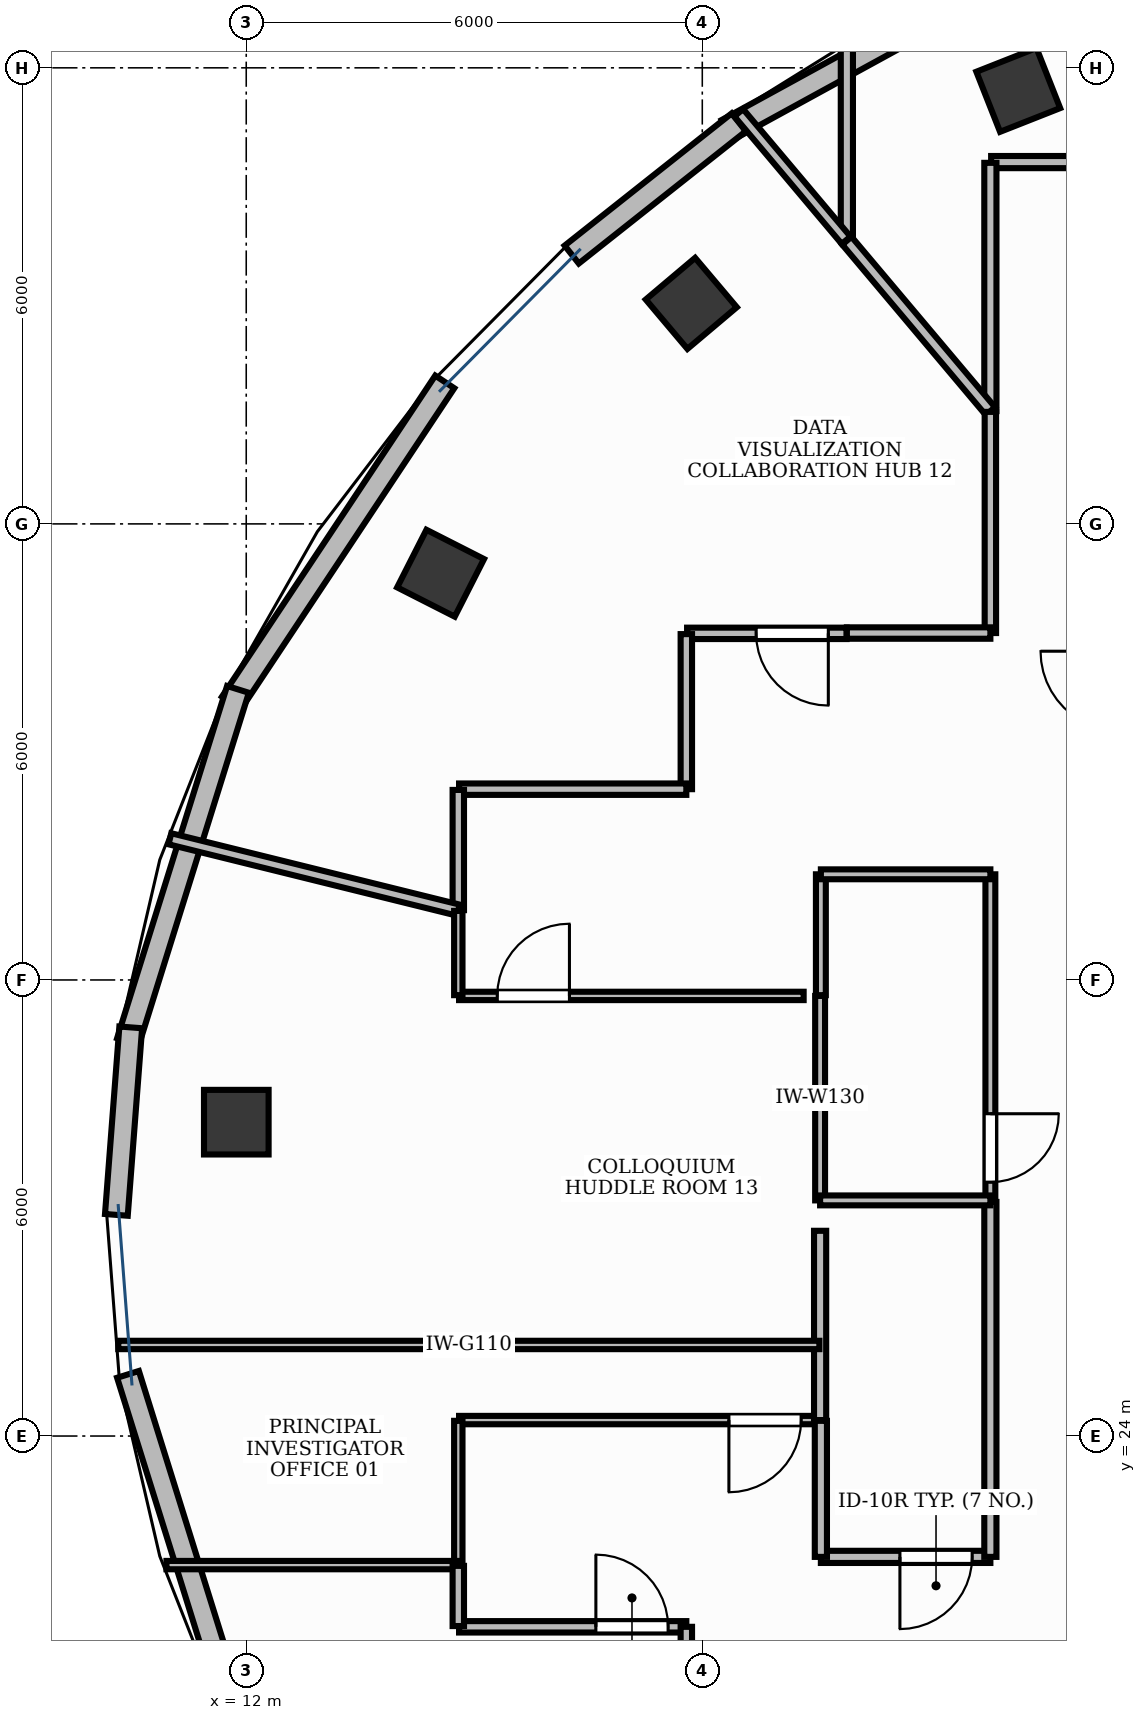
"""IFC4 building model, lengths in metres.
Left out: names, types, materials, properties, quantities, classifications, styles, units other than length and angle.
Written with IfcOpenShell. Run it as: python <this file> out.ifc"""

import sys

from ifc_helpers import new_model, si_unit, direction, frame, frame_2d, origin, origin_2d, place, context, subcontext, project, spatial, rectangle, extrude, element, fill, save


model = new_model("IFC4")
c1 = context("Model", 3, precision=1e-05, world=origin(), true_north=direction((0.0, 1.0)))
c2 = subcontext(c1, "Body", "Model", "MODEL_VIEW")
j1 = project(units=[si_unit("LENGTHUNIT", "METRE"), si_unit("PLANEANGLEUNIT", "RADIAN")], contexts=[c1])
p1 = place(None, origin())
s1 = spatial("IfcSite", under=j1, at=p1, CompositionType="ELEMENT")
p2 = place(p1, origin())
s2 = spatial("IfcBuilding", under=s1, at=p2, CompositionType="ELEMENT")
p3 = place(p2, frame((0.0, 0.0, 282.6)))
s3 = spatial("IfcBuildingStorey", under=s2, at=p3, CompositionType="ELEMENT", Elevation=282.6)
for number, where, z_axis, x_axis in (
    (1, (22.157, 41.709, -0.0), (0.0, 0.0, 1.0), (0.93, 0.367, 0.0)),
    (2, (17.855, 38.901, -0.0), (0.0, 0.0, 1.0), (0.764, 0.645, 0.0)),
    (3, (14.557, 35.351, -0.0), (0.0, 0.0, 1.0), (0.453, 0.891, 0.0)),
    (4, (11.869, 28.129, -0.0), (0.0, 0.0, 1.0), (0.0, 1.0, 0.0)),
):
    element("IfcColumn", number, at=place(p3, frame(where, z_axis=z_axis, x_axis=x_axis)), inside=s3, PredefinedType="COLUMN", context=c2, shape_type="SweptSolid", body=[
        extrude(rectangle(XDim=0.85, YDim=0.85, at=origin_2d()), origin(), (0.0, 0.0, 1.0), 3.791),
    ])
p4 = place(p3, frame((23.286, 43.898, 0.0), z_axis=(0.0, 0.0, 1.0), x_axis=(-0.877062479499, -0.480376318166, 0.0)))
e5 = element("IfcWall", 5, at=p4, inside=s3, PredefinedType="STANDARD", context=c2, shape_type="SweptSolid", body=[
    extrude(rectangle(XDim=5.654, YDim=0.3, at=frame_2d((2.827, 0.0))), origin(), (0.0, 0.0, 1.0), 3.79),
])
p5 = place(p3, frame((18.48, 41.283, 0.0), z_axis=(0.0, 0.0, 1.0), x_axis=(-0.784028163495, -0.620725252303, 0.0)))
e6 = element("IfcWall", 6, at=p5, inside=s3, PredefinedType="STANDARD", context=c2, shape_type="SweptSolid", body=[
    extrude(rectangle(XDim=2.803, YDim=0.3, at=frame_2d((1.402, 0.0))), origin(), (0.0, 0.0, 1.0), 3.79),
])
p6 = place(p3, frame((14.612, 37.868, 0.0), z_axis=(0.0, 0.0, 1.0), x_axis=(-0.553332864868, -0.832960227536, 0.0)))
e7 = element("IfcWall", 7, at=p6, inside=s3, PredefinedType="STANDARD", context=c2, shape_type="SweptSolid", body=[
    extrude(rectangle(XDim=5.071, YDim=0.3, at=frame_2d((2.535, 0.0))), origin(), (0.0, 0.0, 1.0), 3.36),
])
p7 = place(p3, frame((11.891, 33.823, 0.0), z_axis=(0.0, 0.0, 1.0), x_axis=(-0.297974306034, -0.954573890772, 0.0)))
e8 = element("IfcWall", 8, at=p7, inside=s3, PredefinedType="STANDARD", context=c2, shape_type="SweptSolid", body=[
    extrude(rectangle(XDim=4.854, YDim=0.3, at=frame_2d((2.427, 0.0))), origin(), (0.0, 0.0, 1.0), 3.79),
])
p8 = place(p3, frame((10.48, 29.376, 0.0), z_axis=(0.0, 0.0, 1.0), x_axis=(-0.076379552952, -0.997078815285, 0.0)))
e9 = element("IfcWall", 9, at=p8, inside=s3, PredefinedType="STANDARD", context=c2, shape_type="SweptSolid", body=[
    extrude(rectangle(XDim=2.474, YDim=0.3, at=frame_2d((1.237, 0.0))), origin(), (0.0, 0.0, 1.0), 3.79),
])
p9 = place(p3, frame((10.445, 24.811, 0.0), z_axis=(0.0, 0.0, 1.0), x_axis=(0.297974306034, -0.954573890772, 0.0)))
e10 = element("IfcWall", 10, at=p9, inside=s3, PredefinedType="STANDARD", context=c2, shape_type="SweptSolid", body=[
    extrude(rectangle(XDim=4.854, YDim=0.3, at=frame_2d((2.427, 0.0))), origin(), (0.0, 0.0, 1.0), 3.79),
])
p10 = place(p3, frame((21.79, 22.41, 0.0), z_axis=(0.0, 0.0, 1.0), x_axis=(-1.0, 0.0, 0.0)))
e11 = element("IfcWall", 11, at=p10, inside=s3, PredefinedType="PARTITIONING", context=c2, shape_type="SweptSolid", body=[
    extrude(rectangle(XDim=2.23, YDim=0.16, at=frame_2d((1.115, 0.0))), origin(), (0.0, 0.0, 1.0), 2.8),
])
p11 = place(p10, frame((0.24, 0.0, 0.0)))
e12 = element("IfcOpeningElement", 12, at=p11, cuts=e11, PredefinedType="OPENING", context=c2, shape_type="SweptSolid", body=[
    extrude(rectangle(XDim=0.95, YDim=2.15, at=frame_2d((0.475, 1.075))), frame((0.0, 0.095, 0.0), z_axis=(0.0, -1.0, 0.0), x_axis=(1.0, 0.0, 0.0)), (0.0, 0.0, 1.0), 0.19),
])
p12 = place(p3, frame((21.79, 31.39, 0.0), z_axis=(0.0, 0.0, 1.0), x_axis=(0.0, -1.0, 0.0)))
e13 = element("IfcWall", 13, at=p12, inside=s3, PredefinedType="PARTITIONING", context=c2, shape_type="SweptSolid", body=[
    extrude(rectangle(XDim=4.29, YDim=0.13, at=frame_2d((2.145, 0.0))), origin(), (0.0, 0.0, 1.0), 2.8),
])
p13 = place(p12, frame((3.15, 0.0, 0.0)))
e14 = element("IfcOpeningElement", 14, at=p13, cuts=e13, PredefinedType="OPENING", context=c2, shape_type="SweptSolid", body=[
    extrude(rectangle(XDim=0.9, YDim=2.15, at=frame_2d((0.45, 1.075))), frame((0.0, 0.08, 0.0), z_axis=(0.0, -1.0, 0.0), x_axis=(1.0, 0.0, 0.0)), (0.0, 0.0, 1.0), 0.16),
])
p14 = place(p3, frame((19.54, 24.21, 0.0), z_axis=(0.0, 0.0, 1.0), x_axis=(-1.0, 0.0, 0.0)))
e15 = element("IfcWall", 15, at=p14, inside=s3, PredefinedType="MOVABLE", context=c2, shape_type="SweptSolid", body=[
    extrude(rectangle(XDim=4.74, YDim=0.11, at=frame_2d((2.37, 0.0))), origin(), (0.0, 0.0, 1.0), 2.8),
])
p15 = place(p14, frame((0.24, 0.0, 0.0)))
e16 = element("IfcOpeningElement", 16, at=p15, cuts=e15, PredefinedType="OPENING", context=c2, shape_type="SweptSolid", body=[
    extrude(rectangle(XDim=0.95, YDim=2.15, at=frame_2d((0.475, 1.075))), frame((0.0, 0.07, 0.0), z_axis=(0.0, -1.0, 0.0), x_axis=(1.0, 0.0, 0.0)), (0.0, 0.0, 1.0), 0.14),
])
p16 = place(p3, frame((14.8, 21.49, 0.0), z_axis=(0.0, 0.0, 1.0), x_axis=(1.0, 0.0, 0.0)))
e17 = element("IfcWall", 17, at=p16, inside=s3, PredefinedType="PARTITIONING", context=c2, shape_type="SweptSolid", body=[
    extrude(rectangle(XDim=2.99, YDim=0.15, at=frame_2d((1.495, 0.0))), origin(), (0.0, 0.0, 1.0), 2.8),
])
p17 = place(p16, frame((1.8, 0.0, 0.0)))
e18 = element("IfcOpeningElement", 18, at=p17, cuts=e17, PredefinedType="OPENING", context=c2, shape_type="SweptSolid", body=[
    extrude(rectangle(XDim=0.95, YDim=2.15, at=frame_2d((0.475, 1.075))), frame((0.0, 0.09, 0.0), z_axis=(0.0, -1.0, 0.0), x_axis=(1.0, 0.0, 0.0)), (0.0, 0.0, 1.0), 0.18),
])
p18 = place(p3, frame((33.784, 40.76, 0.0), z_axis=(0.0, 0.0, 1.0), x_axis=(-1.0, 0.0, 0.0)))
e19 = element("IfcWall", 19, at=p18, inside=s3, PredefinedType="PARTITIONING", context=c2, shape_type="SweptSolid", body=[
    extrude(rectangle(XDim=11.984, YDim=0.16, at=frame_2d((5.992, 0.0))), origin(), (0.0, 0.0, 1.0), 2.8),
])
p19 = place(p18, frame((0.24, 0.0, 0.0)))
e20 = element("IfcOpeningElement", 20, at=p19, cuts=e19, PredefinedType="OPENING", context=c2, shape_type="SweptSolid", body=[
    extrude(rectangle(XDim=0.95, YDim=2.15, at=frame_2d((0.475, 1.075))), frame((0.0, 0.095, 0.0), z_axis=(0.0, -1.0, 0.0), x_axis=(1.0, 0.0, 0.0)), (0.0, 0.0, 1.0), 0.19),
])
p20 = place(p3, frame((19.898, 34.56, 0.0), z_axis=(0.0, 0.0, 1.0), x_axis=(-1.0, 0.0, 0.0)))
e21 = element("IfcWall", 21, at=p20, inside=s3, PredefinedType="PARTITIONING", context=c2, shape_type="SweptSolid", body=[
    extrude(rectangle(XDim=2.098, YDim=0.15, at=frame_2d((1.049, 0.0))), origin(), (0.0, 0.0, 1.0), 2.8),
])
p21 = place(p20, frame((0.24, 0.0, 0.0)))
e22 = element("IfcOpeningElement", 22, at=p21, cuts=e21, PredefinedType="OPENING", context=c2, shape_type="SweptSolid", body=[
    extrude(rectangle(XDim=0.95, YDim=2.15, at=frame_2d((0.475, 1.075))), frame((0.0, 0.09, 0.0), z_axis=(0.0, -1.0, 0.0), x_axis=(1.0, 0.0, 0.0)), (0.0, 0.0, 1.0), 0.18),
])
p22 = place(p3, frame((14.8, 29.79, 0.0), z_axis=(0.0, 0.0, 1.0), x_axis=(1.0, 0.0, 0.0)))
e23 = element("IfcWall", 23, at=p22, inside=s3, PredefinedType="MOVABLE", context=c2, shape_type="SweptSolid", body=[
    extrude(rectangle(XDim=4.533, YDim=0.11, at=frame_2d((2.267, 0.0))), origin(), (0.0, 0.0, 1.0), 2.8),
])
p23 = place(p22, frame((0.502, 0.0, 0.0)))
e24 = element("IfcOpeningElement", 24, at=p23, cuts=e23, PredefinedType="OPENING", context=c2, shape_type="SweptSolid", body=[
    extrude(rectangle(XDim=0.95, YDim=2.15, at=frame_2d((0.475, 1.075))), frame((0.0, 0.07, 0.0), z_axis=(0.0, -1.0, 0.0), x_axis=(1.0, 0.0, 0.0)), (0.0, 0.0, 1.0), 0.14),
])
p24 = place(p3, frame((21.79, 27.08, 0.0), z_axis=(0.0, 0.0, 1.0), x_axis=(0.0, -1.0, 0.0)))
e25 = element("IfcWall", 25, at=p24, inside=s3, PredefinedType="PARTITIONING", context=c2, shape_type="SweptSolid", body=[
    extrude(rectangle(XDim=4.67, YDim=0.16, at=frame_2d((2.335, 0.0))), origin(), (0.0, 0.0, 1.0), 2.8),
])
p25 = place(p3, frame((19.56, 22.41, 0.0), z_axis=(0.0, 0.0, 1.0), x_axis=(0.0, 1.0, 0.0)))
e26 = element("IfcWall", 26, at=p25, inside=s3, PredefinedType="PARTITIONING", context=c2, shape_type="SweptSolid", body=[
    extrude(rectangle(XDim=1.79, YDim=0.16, at=frame_2d((0.895, 0.0))), origin(), (0.0, 0.0, 1.0), 2.8),
])
p26 = place(p3, frame((19.55, 24.21, 0.0), z_axis=(0.0, 0.0, 1.0), x_axis=(0.0, 1.0, 0.0)))
e27 = element("IfcWall", 27, at=p26, inside=s3, PredefinedType="PARTITIONING", context=c2, shape_type="SweptSolid", body=[
    extrude(rectangle(XDim=2.49, YDim=0.16, at=frame_2d((1.245, 0.0))), origin(), (0.0, 0.0, 1.0), 2.8),
])
p27 = place(p3, frame((19.55, 27.1, 0.0), z_axis=(0.0, 0.0, 1.0), x_axis=(0.0, 1.0, 0.0)))
e28 = element("IfcWall", 28, at=p27, inside=s3, PredefinedType="PARTITIONING", context=c2, shape_type="SweptSolid", body=[
    extrude(rectangle(XDim=2.69, YDim=0.13, at=frame_2d((1.345, 0.0))), origin(), (0.0, 0.0, 1.0), 2.8),
])
p28 = place(p3, frame((19.56, 29.8, 0.0), z_axis=(0.0, 0.0, 1.0), x_axis=(0.0, 1.0, 0.0)))
e29 = element("IfcWall", 29, at=p28, inside=s3, PredefinedType="PARTITIONING", context=c2, shape_type="SweptSolid", body=[
    extrude(rectangle(XDim=1.59, YDim=0.13, at=frame_2d((0.795, 0.0))), origin(), (0.0, 0.0, 1.0), 2.8),
])
p29 = place(p3, frame((19.56, 31.39, 0.0), z_axis=(0.0, 0.0, 1.0), x_axis=(1.0, 0.0, 0.0)))
e30 = element("IfcWall", 30, at=p29, inside=s3, PredefinedType="PARTITIONING", context=c2, shape_type="SweptSolid", body=[
    extrude(rectangle(XDim=2.23, YDim=0.13, at=frame_2d((1.115, 0.0))), origin(), (0.0, 0.0, 1.0), 2.8),
])
p30 = place(p3, frame((21.79, 27.1, 0.0), z_axis=(0.0, 0.0, 1.0), x_axis=(-1.0, 0.0, 0.0)))
e31 = element("IfcWall", 31, at=p30, inside=s3, PredefinedType="PARTITIONING", context=c2, shape_type="SweptSolid", body=[
    extrude(rectangle(XDim=2.24, YDim=0.13, at=frame_2d((1.12, 0.0))), origin(), (0.0, 0.0, 1.0), 2.8),
])
p31 = place(p3, frame((10.317, 25.198, 0.0), z_axis=(0.0, 0.0, 1.0), x_axis=(1.0, 0.0, 0.0)))
e32 = element("IfcWall", 32, at=p31, inside=s3, PredefinedType="MOVABLE", context=c2, shape_type="SweptSolid", body=[
    extrude(rectangle(XDim=9.223, YDim=0.11, at=frame_2d((4.612, 0.0))), origin(), (0.0, 0.0, 1.0), 2.8),
])
p32 = place(p3, frame((14.79, 24.2, 0.0), z_axis=(0.0, 0.0, 1.0), x_axis=(0.0, -1.0, 0.0)))
e33 = element("IfcWall", 33, at=p32, inside=s3, PredefinedType="MOVABLE", context=c2, shape_type="SweptSolid", body=[
    extrude(rectangle(XDim=1.898, YDim=0.11, at=frame_2d((0.949, 0.0))), origin(), (0.0, 0.0, 1.0), 2.8),
])
p33 = place(p3, frame((14.79, 22.302, 0.0), z_axis=(0.0, 0.0, 1.0), x_axis=(-1.0, 0.0, 0.0)))
e34 = element("IfcWall", 34, at=p33, inside=s3, PredefinedType="MOVABLE", context=c2, shape_type="SweptSolid", body=[
    extrude(rectangle(XDim=3.839, YDim=0.11, at=frame_2d((1.92, 0.0))), origin(), (0.0, 0.0, 1.0), 2.8),
])
p34 = place(p3, frame((14.79, 22.292, 0.0), z_axis=(0.0, 0.0, 1.0), x_axis=(0.0, -1.0, 0.0)))
e35 = element("IfcWall", 35, at=p34, inside=s3, PredefinedType="PARTITIONING", context=c2, shape_type="SweptSolid", body=[
    extrude(rectangle(XDim=0.792, YDim=0.15, at=frame_2d((0.396, 0.0))), origin(), (0.0, 0.0, 1.0), 2.8),
])
p35 = place(p3, frame((17.79, 21.49, 0.0), z_axis=(0.0, 0.0, 1.0), x_axis=(0.0, -1.0, 0.0)))
e36 = element("IfcWall", 36, at=p35, inside=s3, PredefinedType="PARTITIONING", context=c2, shape_type="SweptSolid", body=[
    extrude(rectangle(XDim=1.422, YDim=0.15, at=frame_2d((0.711, 0.0))), origin(), (0.0, 0.0, 1.0), 2.8),
])
p36 = place(p3, frame((19.902, 39.726, 0.0), z_axis=(0.0, 0.0, 1.0), x_axis=(0.0, 1.0, 0.0)))
e37 = element("IfcWall", 37, at=p36, inside=s3, PredefinedType="PARTITIONING", context=c2, shape_type="SweptSolid", body=[
    extrude(rectangle(XDim=2.522, YDim=0.16, at=frame_2d((1.261, 0.0))), origin(), (0.0, 0.0, 1.0), 2.8),
])
p37 = place(p3, frame((21.79, 40.75, 0.0), z_axis=(0.0, 0.0, 1.0), x_axis=(0.0, -1.0, 0.0)))
e38 = element("IfcWall", 38, at=p37, inside=s3, PredefinedType="PARTITIONING", context=c2, shape_type="SweptSolid", body=[
    extrude(rectangle(XDim=3.266, YDim=0.16, at=frame_2d((1.633, 0.0))), origin(), (0.0, 0.0, 1.0), 2.8),
])
p38 = place(p3, frame((21.79, 37.484, 0.0), z_axis=(0.0, 0.0, 1.0), x_axis=(-0.644133180728, 0.764913358156, 0.0)))
e39 = element("IfcWall", 39, at=p38, inside=s3, PredefinedType="PARTITIONING", context=c2, shape_type="SweptSolid", body=[
    extrude(rectangle(XDim=2.931, YDim=0.16, at=frame_2d((1.465, 0.0))), origin(), (0.0, 0.0, 1.0), 2.8),
])
p39 = place(p3, frame((18.479, 41.409, 0.0), z_axis=(0.0, 0.0, 1.0), x_axis=(0.644139173412, -0.764908311679, 0.0)))
e40 = element("IfcWall", 40, at=p39, inside=s3, PredefinedType="PARTITIONING", context=c2, shape_type="SweptSolid", body=[
    extrude(rectangle(XDim=2.193, YDim=0.15, at=frame_2d((1.097, 0.0))), origin(), (0.0, 0.0, 1.0), 2.8),
])
p40 = place(p3, frame((21.79, 37.474, 0.0), z_axis=(0.0, 0.0, 1.0), x_axis=(0.0, -1.0, 0.0)))
e41 = element("IfcWall", 41, at=p40, inside=s3, PredefinedType="PARTITIONING", context=c2, shape_type="SweptSolid", body=[
    extrude(rectangle(XDim=2.91, YDim=0.15, at=frame_2d((1.455, 0.0))), origin(), (0.0, 0.0, 1.0), 2.8),
])
p41 = place(p3, frame((21.79, 34.564, 0.0), z_axis=(0.0, 0.0, 1.0), x_axis=(-1.0, 0.0, 0.0)))
e42 = element("IfcWall", 42, at=p41, inside=s3, PredefinedType="PARTITIONING", context=c2, shape_type="SweptSolid", body=[
    extrude(rectangle(XDim=1.888, YDim=0.15, at=frame_2d((0.944, 0.0))), origin(), (0.0, 0.0, 1.0), 2.8),
])
p42 = place(p3, frame((17.79, 34.55, 0.0), z_axis=(0.0, 0.0, 1.0), x_axis=(0.0, -1.0, 0.0)))
e43 = element("IfcWall", 43, at=p42, inside=s3, PredefinedType="PARTITIONING", context=c2, shape_type="SweptSolid", body=[
    extrude(rectangle(XDim=2.04, YDim=0.15, at=frame_2d((1.02, 0.0))), origin(), (0.0, 0.0, 1.0), 2.8),
])
p43 = place(p3, frame((17.79, 32.51, 0.0), z_axis=(0.0, 0.0, 1.0), x_axis=(-1.0, 0.0, 0.0)))
e44 = element("IfcWall", 44, at=p43, inside=s3, PredefinedType="PARTITIONING", context=c2, shape_type="SweptSolid", body=[
    extrude(rectangle(XDim=2.99, YDim=0.15, at=frame_2d((1.495, 0.0))), origin(), (0.0, 0.0, 1.0), 2.8),
])
p44 = place(p3, frame((14.79, 32.5, 0.0), z_axis=(0.0, 0.0, 1.0), x_axis=(0.0, -1.0, 0.0)))
e45 = element("IfcWall", 45, at=p44, inside=s3, PredefinedType="PARTITIONING", context=c2, shape_type="SweptSolid", body=[
    extrude(rectangle(XDim=1.582, YDim=0.15, at=frame_2d((0.791, 0.0))), origin(), (0.0, 0.0, 1.0), 2.8),
])
p45 = place(p3, frame((14.79, 30.918, 0.0), z_axis=(0.0, 0.0, 1.0), x_axis=(-0.97071660792, 0.240227531952, 0.0)))
e46 = element("IfcWall", 46, at=p45, inside=s3, PredefinedType="PARTITIONING", context=c2, shape_type="SweptSolid", body=[
    extrude(rectangle(XDim=3.909, YDim=0.15, at=frame_2d((1.954, 0.0))), origin(), (0.0, 0.0, 1.0), 2.8),
])
p46 = place(p3, frame((14.79, 30.908, 0.0), z_axis=(0.0, 0.0, 1.0), x_axis=(0.0, -1.0, 0.0)))
e47 = element("IfcWall", 47, at=p46, inside=s3, PredefinedType="MOVABLE", context=c2, shape_type="SweptSolid", body=[
    extrude(rectangle(XDim=1.108, YDim=0.11, at=frame_2d((0.554, 0.0))), origin(), (0.0, 0.0, 1.0), 2.8),
])
p47 = place(p11, origin())
e48 = element("IfcDoor", 48, at=p47, inside=s3, OperationType="SINGLE_SWING_RIGHT", PredefinedType="DOOR", context=c2, shape_type="SweptSolid", body=[
    extrude(rectangle(XDim=0.95, YDim=2.15, at=frame_2d((0.475, 1.075))), frame((0.0, 0.025, 0.0), z_axis=(0.0, -1.0, 0.0), x_axis=(1.0, 0.0, 0.0)), (0.0, 0.0, 1.0), 0.05),
])
fill(e12, e48)
p48 = place(p13, origin())
e49 = element("IfcDoor", 49, at=p48, inside=s3, OperationType="SINGLE_SWING_LEFT", PredefinedType="DOOR", context=c2, shape_type="SweptSolid", body=[
    extrude(rectangle(XDim=0.9, YDim=2.15, at=frame_2d((0.45, 1.075))), frame((0.0, 0.025, 0.0), z_axis=(0.0, -1.0, 0.0), x_axis=(1.0, 0.0, 0.0)), (0.0, 0.0, 1.0), 0.05),
])
fill(e14, e49)
p49 = place(p15, origin())
e50 = element("IfcDoor", 50, at=p49, inside=s3, OperationType="SINGLE_SWING_RIGHT", PredefinedType="DOOR", context=c2, shape_type="SweptSolid", body=[
    extrude(rectangle(XDim=0.95, YDim=2.15, at=frame_2d((0.475, 1.075))), frame((0.0, 0.025, 0.0), z_axis=(0.0, -1.0, 0.0), x_axis=(1.0, 0.0, 0.0)), (0.0, 0.0, 1.0), 0.05),
])
fill(e16, e50)
p50 = place(p17, origin())
e51 = element("IfcDoor", 51, at=p50, inside=s3, OperationType="SINGLE_SWING_LEFT", PredefinedType="DOOR", context=c2, shape_type="SweptSolid", body=[
    extrude(rectangle(XDim=0.95, YDim=2.15, at=frame_2d((0.475, 1.075))), frame((0.0, 0.025, 0.0), z_axis=(0.0, -1.0, 0.0), x_axis=(1.0, 0.0, 0.0)), (0.0, 0.0, 1.0), 0.05),
])
fill(e18, e51)
p51 = place(p21, origin())
e52 = element("IfcDoor", 52, at=p51, inside=s3, OperationType="SINGLE_SWING_LEFT", PredefinedType="DOOR", context=c2, shape_type="SweptSolid", body=[
    extrude(rectangle(XDim=0.95, YDim=2.15, at=frame_2d((0.475, 1.075))), frame((0.0, 0.025, 0.0), z_axis=(0.0, -1.0, 0.0), x_axis=(1.0, 0.0, 0.0)), (0.0, 0.0, 1.0), 0.05),
])
fill(e22, e52)
p52 = place(p23, origin())
e53 = element("IfcDoor", 53, at=p52, inside=s3, OperationType="SINGLE_SWING_RIGHT", PredefinedType="DOOR", context=c2, shape_type="SweptSolid", body=[
    extrude(rectangle(XDim=0.95, YDim=2.15, at=frame_2d((0.475, 1.075))), frame((0.0, 0.025, 0.0), z_axis=(0.0, -1.0, 0.0), x_axis=(1.0, 0.0, 0.0)), (0.0, 0.0, 1.0), 0.05),
])
fill(e24, e53)
save(model, sys.argv[1])
